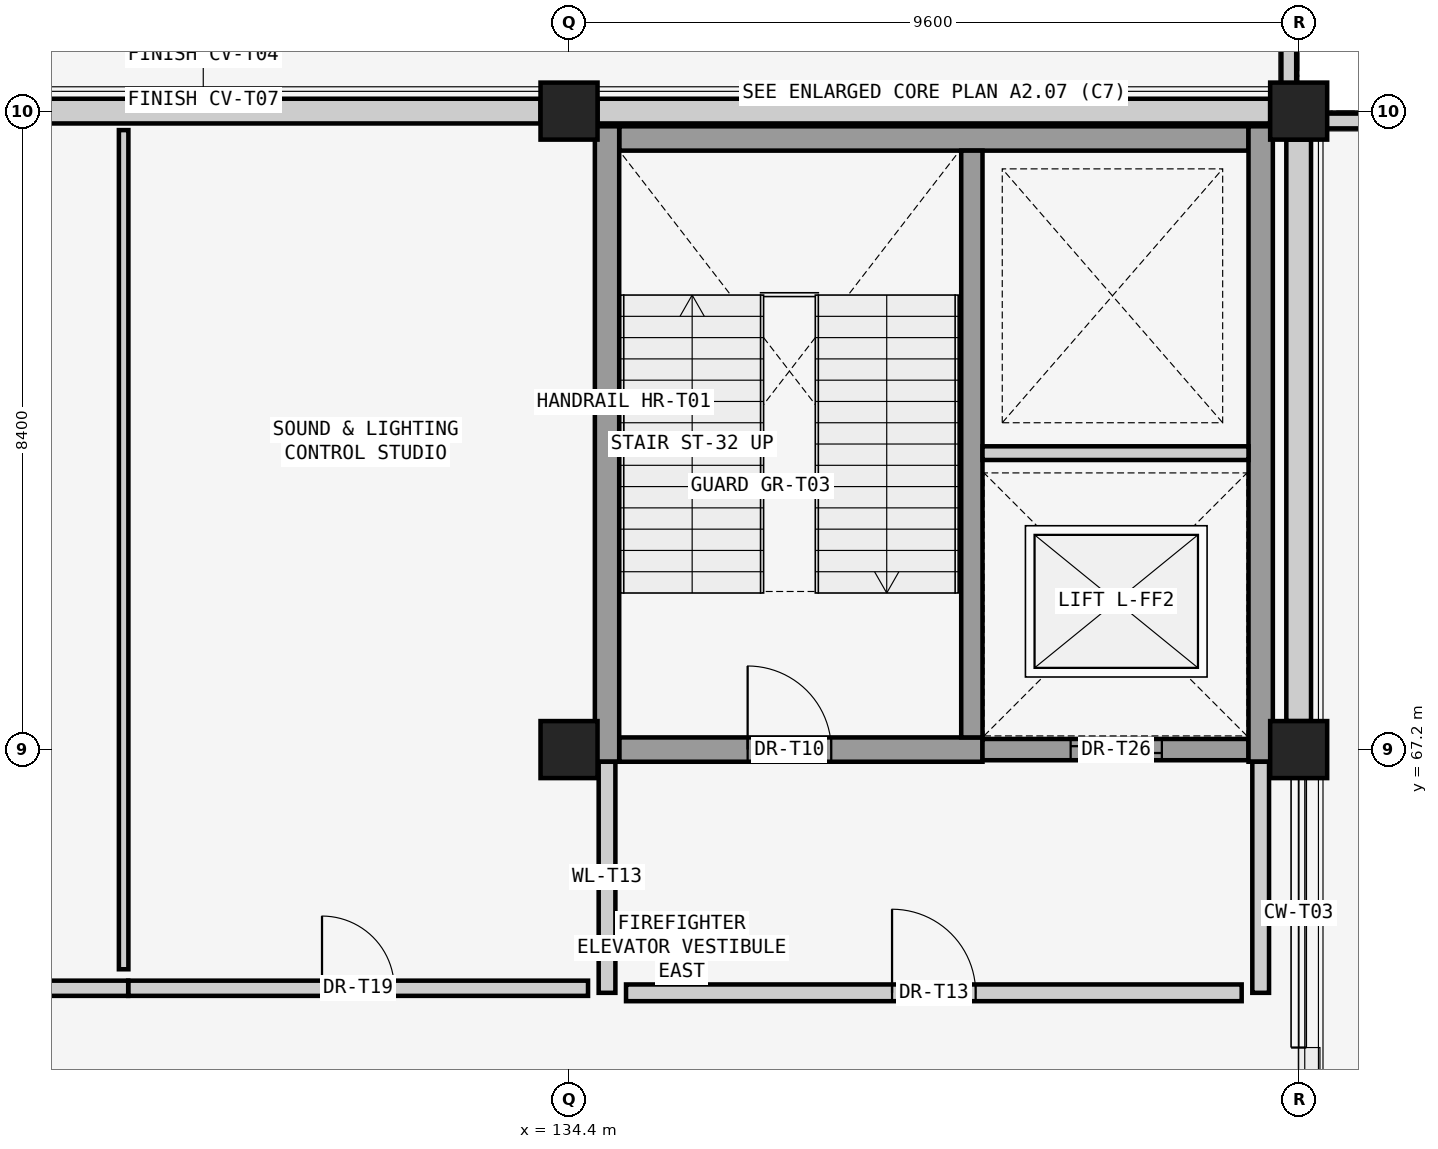
"""IFC4 building model, lengths in metres.
Left out: names, types, materials, properties, quantities, classifications, styles, units other than length and angle.
Written with IfcOpenShell. Run it as: python <this file> out.ifc"""

import sys

from ifc_helpers import new_model, si_unit, direction, frame, frame_2d, origin, origin_2d, place, context, subcontext, project, spatial, rectangle, extrude, element, fill, save


model = new_model("IFC4")
c1 = context("Model", 3, precision=1e-05, world=origin(), true_north=direction((0.0, 1.0)))
c2 = subcontext(c1, "Body", "Model", "MODEL_VIEW")
j1 = project(units=[si_unit("LENGTHUNIT", "METRE"), si_unit("PLANEANGLEUNIT", "RADIAN")], contexts=[c1])
p1 = place(None, origin())
s1 = spatial("IfcSite", under=j1, at=p1, CompositionType="ELEMENT")
p2 = place(p1, origin())
s2 = spatial("IfcBuilding", under=s1, at=p2, CompositionType="ELEMENT")
p3 = place(p2, frame((0.0, 0.0, 10.2)))
s3 = spatial("IfcBuildingStorey", under=s2, at=p3, CompositionType="ELEMENT", Elevation=10.2)
for number, where, z_axis, x_axis in (
    (1, (134.4, 67.2, 0.0), (0.0, 0.0, 1.0), (1.0, 0.0, 0.0)),
    (2, (134.4, 75.6, 0.0), (0.0, 0.0, 1.0), (1.0, 0.0, 0.0)),
    (3, (144.0, 67.2, 0.0), (0.0, 0.0, 1.0), (1.0, 0.0, 0.0)),
    (4, (144.0, 75.6, 0.0), (0.0, 0.0, 1.0), (1.0, 0.0, 0.0)),
):
    element("IfcColumn", number, at=place(p3, frame(where, z_axis=z_axis, x_axis=x_axis)), inside=s3, PredefinedType="COLUMN", context=c2, shape_type="SweptSolid", body=[
        extrude(rectangle(XDim=0.75, YDim=0.75, at=origin_2d()), origin(), (0.0, 0.0, 1.0), 4.56),
    ])
p4 = place(p3, frame((125.15, 75.6, 0.0), z_axis=(0.0, 0.0, 1.0), x_axis=(1.0, 0.0, 0.0)))
e5 = element("IfcWall", 5, at=p4, inside=s3, PredefinedType="SOLIDWALL", context=c2, shape_type="SweptSolid", body=[
    extrude(rectangle(XDim=8.875, YDim=0.325, at=frame_2d((4.438, 0.0))), origin(), (0.0, 0.0, 1.0), 4.178),
])
p5 = place(p3, frame((134.775, 75.6, 0.0), z_axis=(0.0, 0.0, 1.0), x_axis=(1.0, 0.0, 0.0)))
e6 = element("IfcWall", 6, at=p5, inside=s3, PredefinedType="SOLIDWALL", context=c2, shape_type="SweptSolid", body=[
    extrude(rectangle(XDim=8.85, YDim=0.325, at=frame_2d((4.425, 0.0))), origin(), (0.0, 0.0, 1.0), 4.208),
])
p6 = place(p3, frame((144.0, 75.225, 0.0), z_axis=(0.0, 0.0, 1.0), x_axis=(0.0, -1.0, 0.0)))
e7 = element("IfcWall", 7, at=p6, inside=s3, PredefinedType="SOLIDWALL", context=c2, shape_type="SweptSolid", body=[
    extrude(rectangle(XDim=7.65, YDim=0.325, at=frame_2d((3.825, 0.0))), origin(), (0.0, 0.0, 1.0), 4.208),
])
p7 = place(p3, frame((144.16, 75.47, 0.0), z_axis=(0.0, 0.0, 1.0), x_axis=(1.0, 0.0, 0.0)))
e8 = element("IfcWall", 8, at=p7, inside=s3, PredefinedType="PARAPET", context=c2, shape_type="SweptSolid", body=[
    extrude(rectangle(XDim=9.28, YDim=0.195, at=frame_2d((4.64, 0.0))), origin(), (0.0, 0.0, 1.0), 1.15),
])
p8 = place(p3, frame((143.87, 83.84, 0.0), z_axis=(0.0, 0.0, 1.0), x_axis=(0.0, -1.0, 0.0)))
e9 = element("IfcWall", 9, at=p8, inside=s3, PredefinedType="PARAPET", context=c2, shape_type="SweptSolid", body=[
    extrude(rectangle(XDim=8.08, YDim=0.195, at=frame_2d((4.04, 0.0))), origin(), (0.0, 0.0, 1.0), 1.15),
])
p9 = place(p3, frame((135.06, 67.2, 0.0), z_axis=(0.0, 0.0, 1.0), x_axis=(1.0, 0.0, 0.0)))
e10 = element("IfcWall", 10, at=p9, inside=s3, PredefinedType="SHEAR", context=c2, shape_type="SweptSolid", body=[
    extrude(rectangle(XDim=4.78, YDim=0.32, at=frame_2d((2.39, 0.0))), origin(), (0.0, 0.0, 1.0), 4.54),
])
p10 = place(p9, frame((1.69, 0.0, 0.0)))
e11 = element("IfcOpeningElement", 11, at=p10, cuts=e10, PredefinedType="OPENING", context=c2, shape_type="SweptSolid", body=[
    extrude(rectangle(XDim=1.1, YDim=2.2, at=frame_2d((0.55, 1.1))), frame((0.0, 0.17, 0.0), z_axis=(0.0, -1.0, 0.0), x_axis=(1.0, 0.0, 0.0)), (0.0, 0.0, 1.0), 0.34),
])
p11 = place(p3, frame((139.84, 67.2, 0.0), z_axis=(0.0, 0.0, 1.0), x_axis=(1.0, 0.0, 0.0)))
e12 = element("IfcWall", 12, at=p11, inside=s3, PredefinedType="SHEAR", context=c2, shape_type="SweptSolid", body=[
    extrude(rectangle(XDim=3.5, YDim=0.28, at=frame_2d((1.75, 0.0))), origin(), (0.0, 0.0, 1.0), 4.54),
])
p12 = place(p11, frame((1.16, 0.0, 0.0)))
e13 = element("IfcOpeningElement", 13, at=p12, cuts=e12, PredefinedType="OPENING", context=c2, shape_type="SweptSolid", body=[
    extrude(rectangle(XDim=1.2, YDim=2.2, at=frame_2d((0.6, 1.1))), frame((0.0, 0.15, 0.0), z_axis=(0.0, -1.0, 0.0), x_axis=(1.0, 0.0, 0.0)), (0.0, 0.0, 1.0), 0.3),
])
p13 = place(p3, frame((143.34, 75.24, 0.0), z_axis=(0.0, 0.0, 1.0), x_axis=(-1.0, 0.0, 0.0)))
e14 = element("IfcWall", 14, at=p13, inside=s3, PredefinedType="SHEAR", context=c2, shape_type="SweptSolid", body=[
    extrude(rectangle(XDim=8.28, YDim=0.32, at=frame_2d((4.14, 0.0))), origin(), (0.0, 0.0, 1.0), 4.54),
])
for number, where, z_axis, x_axis in (
    (15, (134.9, 75.4, 0.0), (0.0, 0.0, 1.0), (0.0, -1.0, 0.0)),
    (16, (143.5, 67.04, 0.0), (0.0, 0.0, 1.0), (0.0, 1.0, 0.0)),
):
    element("IfcWall", number, at=place(p3, frame(where, z_axis=z_axis, x_axis=x_axis)), inside=s3, PredefinedType="SHEAR", context=c2, shape_type="SweptSolid", body=[
        extrude(rectangle(XDim=8.36, YDim=0.32, at=frame_2d((4.18, 0.0))), origin(), (0.0, 0.0, 1.0), 4.54),
    ])
p14 = place(p3, frame((139.7, 67.36, 0.0), z_axis=(0.0, 0.0, 1.0), x_axis=(0.0, 1.0, 0.0)))
e17 = element("IfcWall", 17, at=p14, inside=s3, PredefinedType="SHEAR", context=c2, shape_type="SweptSolid", body=[
    extrude(rectangle(XDim=7.72, YDim=0.28, at=frame_2d((3.86, 0.0))), origin(), (0.0, 0.0, 1.0), 4.54),
])
p15 = place(p3, frame((139.84, 71.1, 0.0), z_axis=(0.0, 0.0, 1.0), x_axis=(1.0, 0.0, 0.0)))
e18 = element("IfcWall", 18, at=p15, inside=s3, PredefinedType="SOLIDWALL", context=c2, shape_type="SweptSolid", body=[
    extrude(rectangle(XDim=3.5, YDim=0.18, at=frame_2d((1.75, 0.0))), origin(), (0.0, 0.0, 1.0), 4.54),
])
for number, where, z_axis, x_axis in (
    (19, (134.9, 64.0, 0.0), (0.0, 0.0, 1.0), (0.0, 1.0, 0.0)),
    (20, (143.5, 64.0, 0.0), (0.0, 0.0, 1.0), (0.0, 1.0, 0.0)),
):
    element("IfcWall", number, at=place(p3, frame(where, z_axis=z_axis, x_axis=x_axis)), inside=s3, PredefinedType="SOLIDWALL", context=c2, shape_type="SweptSolid", body=[
        extrude(rectangle(XDim=3.04, YDim=0.22, at=frame_2d((1.52, 0.0))), origin(), (0.0, 0.0, 1.0), 4.32),
    ])
p16 = place(p3, frame((135.15, 64.0, 0.0), z_axis=(0.0, 0.0, 1.0), x_axis=(1.0, 0.0, 0.0)))
e21 = element("IfcWall", 21, at=p16, inside=s3, PredefinedType="SOLIDWALL", context=c2, shape_type="SweptSolid", body=[
    extrude(rectangle(XDim=8.1, YDim=0.22, at=frame_2d((4.05, 0.0))), origin(), (0.0, 0.0, 1.0), 4.32),
])
p17 = place(p16, frame((3.5, 0.0, 0.0)))
e22 = element("IfcOpeningElement", 22, at=p17, cuts=e21, PredefinedType="OPENING", context=c2, shape_type="SweptSolid", body=[
    extrude(rectangle(XDim=1.1, YDim=2.2, at=frame_2d((0.55, 1.1))), frame((0.0, 0.12, 0.0), z_axis=(0.0, -1.0, 0.0), x_axis=(1.0, 0.0, 0.0)), (0.0, 0.0, 1.0), 0.24),
])
p18 = place(p3, frame((128.6, 64.06, 0.0), z_axis=(0.0, 0.0, 1.0), x_axis=(1.0, 0.0, 0.0)))
e23 = element("IfcWall", 23, at=p18, inside=s3, PredefinedType="SOLIDWALL", context=c2, shape_type="SweptSolid", body=[
    extrude(rectangle(XDim=6.05, YDim=0.2, at=frame_2d((3.025, 0.0))), origin(), (0.0, 0.0, 1.0), 4.48),
])
p19 = place(p18, frame((2.55, 0.0, 0.0)))
e24 = element("IfcOpeningElement", 24, at=p19, cuts=e23, PredefinedType="OPENING", context=c2, shape_type="SweptSolid", body=[
    extrude(rectangle(XDim=0.95, YDim=2.15, at=frame_2d((0.475, 1.075))), frame((0.0, 0.11, 0.0), z_axis=(0.0, -1.0, 0.0), x_axis=(1.0, 0.0, 0.0)), (0.0, 0.0, 1.0), 0.22),
])
p20 = place(p3, frame((125.0, 64.06, 0.0), z_axis=(0.0, 0.0, 1.0), x_axis=(1.0, 0.0, 0.0)))
e25 = element("IfcWall", 25, at=p20, inside=s3, PredefinedType="SOLIDWALL", context=c2, shape_type="SweptSolid", body=[
    extrude(rectangle(XDim=3.6, YDim=0.2, at=frame_2d((1.8, 0.0))), origin(), (0.0, 0.0, 1.0), 4.48),
])
p21 = place(p3, frame((128.54, 64.31, 0.0), z_axis=(0.0, 0.0, 1.0), x_axis=(0.0, 1.0, 0.0)))
e26 = element("IfcWall", 26, at=p21, inside=s3, PredefinedType="PARTITIONING", context=c2, shape_type="SweptSolid", body=[
    extrude(rectangle(XDim=11.04, YDim=0.125, at=frame_2d((5.52, 0.0))), origin(), (0.0, 0.0, 1.0), 4.48),
])
p22 = place(p10, origin())
e27 = element("IfcDoor", 27, at=p22, inside=s3, OperationType="SINGLE_SWING_LEFT", PredefinedType="DOOR", context=c2, shape_type="SweptSolid", body=[
    extrude(rectangle(XDim=1.1, YDim=2.2, at=frame_2d((0.55, 1.1))), frame((0.0, 0.025, 0.0), z_axis=(0.0, -1.0, 0.0), x_axis=(1.0, 0.0, 0.0)), (0.0, 0.0, 1.0), 0.05),
])
fill(e11, e27)
p23 = place(p12, origin())
e28 = element("IfcDoor", 28, at=p23, inside=s3, OperationType="SLIDING_TO_RIGHT", PredefinedType="DOOR", context=c2, shape_type="SweptSolid", body=[
    extrude(rectangle(XDim=1.2, YDim=2.2, at=frame_2d((0.6, 1.1))), frame((0.0, 0.025, 0.0), z_axis=(0.0, -1.0, 0.0), x_axis=(1.0, 0.0, 0.0)), (0.0, 0.0, 1.0), 0.05),
])
fill(e13, e28)
p24 = place(p17, origin())
e29 = element("IfcDoor", 29, at=p24, inside=s3, OperationType="SINGLE_SWING_LEFT", PredefinedType="DOOR", context=c2, shape_type="SweptSolid", body=[
    extrude(rectangle(XDim=1.1, YDim=2.2, at=frame_2d((0.55, 1.1))), frame((0.0, 0.025, 0.0), z_axis=(0.0, -1.0, 0.0), x_axis=(1.0, 0.0, 0.0)), (0.0, 0.0, 1.0), 0.05),
])
fill(e22, e29)
p25 = place(p19, origin())
e30 = element("IfcDoor", 30, at=p25, inside=s3, OperationType="SINGLE_SWING_LEFT", PredefinedType="DOOR", context=c2, shape_type="SweptSolid", body=[
    extrude(rectangle(XDim=0.95, YDim=2.15, at=frame_2d((0.475, 1.075))), frame((0.0, 0.025, 0.0), z_axis=(0.0, -1.0, 0.0), x_axis=(1.0, 0.0, 0.0)), (0.0, 0.0, 1.0), 0.05),
])
fill(e24, e30)
save(model, sys.argv[1])
